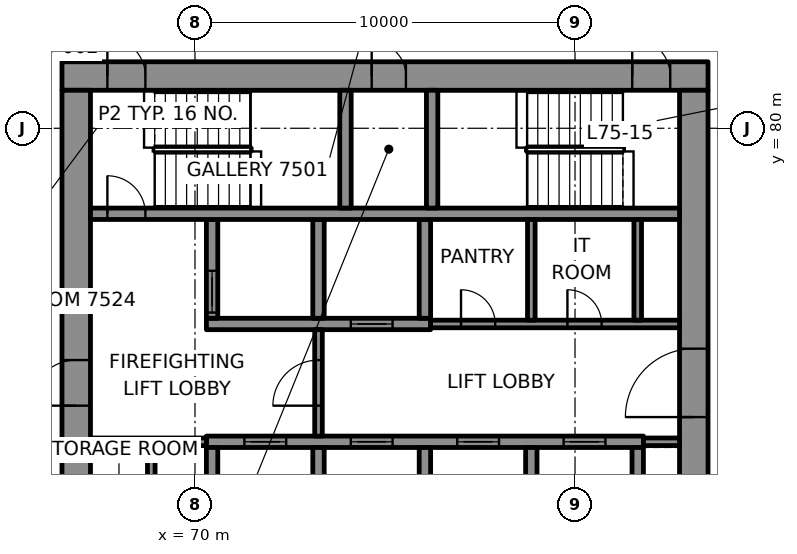
"""IFC4 building model, lengths in metres.
Left out: names, types, materials, properties, quantities, classifications, styles, units other than length and angle.
Written with IfcOpenShell. Run it as: python <this file> out.ifc"""

import sys

from ifc_helpers import new_model, si_unit, direction, frame, frame_2d, origin, place, context, subcontext, project, spatial, rectangle, extrude, element, fill, save


model = new_model("IFC4")
c1 = context("Model", 3, precision=1e-05, world=origin(), true_north=direction((0.0, 1.0)))
c2 = subcontext(c1, "Body", "Model", "MODEL_VIEW")
j1 = project(units=[si_unit("LENGTHUNIT", "METRE"), si_unit("PLANEANGLEUNIT", "RADIAN")], contexts=[c1])
p1 = place(None, origin())
s1 = spatial("IfcSite", under=j1, at=p1, CompositionType="ELEMENT")
p2 = place(p1, origin())
s2 = spatial("IfcBuilding", under=s1, at=p2, CompositionType="ELEMENT")
p3 = place(p2, frame((0.0, 0.0, 309.1)))
s3 = spatial("IfcBuildingStorey", under=s2, at=p3, CompositionType="ELEMENT", Elevation=309.1)
p4 = place(p3, frame((66.5, 81.375, 0.0), z_axis=(0.0, 0.0, 1.0), x_axis=(1.0, 0.0, 0.0)))
e1 = element("IfcWall", 1, at=p4, inside=s3, PredefinedType="SHEAR", context=c2, shape_type="SweptSolid", body=[
    extrude(rectangle(XDim=17.0, YDim=0.75, at=frame_2d((8.5, 0.0))), origin(), (0.0, 0.0, 1.0), 3.3),
])
p5 = place(p4, frame((1.195, 0.0, 0.0)))
e2 = element("IfcOpeningElement", 2, at=p5, cuts=e1, PredefinedType="OPENING", context=c2, shape_type="SweptSolid", body=[
    extrude(rectangle(XDim=1.0, YDim=2.1, at=frame_2d((0.5, 1.05))), frame((0.0, 0.385, 0.0), z_axis=(0.0, -1.0, 0.0), x_axis=(1.0, 0.0, 0.0)), (0.0, 0.0, 1.0), 0.77),
])
p6 = place(p4, frame((15.005, 0.0, 0.0)))
e3 = element("IfcOpeningElement", 3, at=p6, cuts=e1, PredefinedType="OPENING", context=c2, shape_type="SweptSolid", body=[
    extrude(rectangle(XDim=1.0, YDim=2.1, at=frame_2d((0.5, 1.05))), frame((0.0, 0.385, 0.0), z_axis=(0.0, -1.0, 0.0), x_axis=(1.0, 0.0, 0.0)), (0.0, 0.0, 1.0), 0.77),
])
p7 = place(p4, frame((8.15, 0.0, 0.0)))
e4 = element("IfcOpeningElement", 4, at=p7, cuts=e1, PredefinedType="OPENING", context=c2, shape_type="SweptSolid", body=[
    extrude(rectangle(XDim=0.9, YDim=2.1, at=frame_2d((0.45, 1.05))), frame((0.0, 0.385, 0.0), z_axis=(0.0, -1.0, 0.0), x_axis=(1.0, 0.0, 0.0)), (0.0, 0.0, 1.0), 0.77),
])
p8 = place(p3, frame((66.875, 69.0, 0.0), z_axis=(0.0, 0.0, 1.0), x_axis=(0.0, 1.0, 0.0)))
e5 = element("IfcWall", 5, at=p8, inside=s3, PredefinedType="SHEAR", context=c2, shape_type="SweptSolid", body=[
    extrude(rectangle(XDim=12.0, YDim=0.75, at=frame_2d((6.0, 0.0))), origin(), (0.0, 0.0, 1.0), 3.3),
])
p9 = place(p8, frame((3.7, 0.0, 0.0)))
e6 = element("IfcOpeningElement", 6, at=p9, cuts=e5, PredefinedType="OPENING", context=c2, shape_type="SweptSolid", body=[
    extrude(rectangle(XDim=1.2, YDim=2.1, at=frame_2d((0.6, 1.05))), frame((0.0, 0.385, 0.0), z_axis=(0.0, -1.0, 0.0), x_axis=(1.0, 0.0, 0.0)), (0.0, 0.0, 1.0), 0.77),
])
p10 = place(p8, frame((0.925, 0.0, 0.0)))
e7 = element("IfcOpeningElement", 7, at=p10, cuts=e5, PredefinedType="OPENING", context=c2, shape_type="SweptSolid", body=[
    extrude(rectangle(XDim=0.9, YDim=2.1, at=frame_2d((0.45, 1.05))), frame((0.0, 0.385, 0.0), z_axis=(0.0, -1.0, 0.0), x_axis=(1.0, 0.0, 0.0)), (0.0, 0.0, 1.0), 0.77),
])
p11 = place(p3, frame((83.125, 69.0, 0.0), z_axis=(0.0, 0.0, 1.0), x_axis=(0.0, 1.0, 0.0)))
e8 = element("IfcWall", 8, at=p11, inside=s3, PredefinedType="SHEAR", context=c2, shape_type="SweptSolid", body=[
    extrude(rectangle(XDim=12.0, YDim=0.75, at=frame_2d((6.0, 0.0))), origin(), (0.0, 0.0, 1.0), 3.3),
])
p12 = place(p11, frame((3.4, 0.0, 0.0)))
e9 = element("IfcOpeningElement", 9, at=p12, cuts=e8, PredefinedType="OPENING", context=c2, shape_type="SweptSolid", body=[
    extrude(rectangle(XDim=1.8, YDim=2.1, at=frame_2d((0.9, 1.05))), frame((0.0, 0.385, 0.0), z_axis=(0.0, -1.0, 0.0), x_axis=(1.0, 0.0, 0.0)), (0.0, 0.0, 1.0), 0.77),
])
p13 = place(p3, frame((70.3, 71.75, 0.0), z_axis=(0.0, 0.0, 1.0), x_axis=(1.0, 0.0, 0.0)))
e10 = element("IfcWall", 10, at=p13, inside=s3, PredefinedType="SHEAR", context=c2, shape_type="SweptSolid", body=[
    extrude(rectangle(XDim=11.5, YDim=0.3, at=frame_2d((5.75, 0.0))), origin(), (0.0, 0.0, 1.0), 3.3),
])
p14 = place(p13, frame((1.0, 0.0, 0.0)))
e11 = element("IfcOpeningElement", 11, at=p14, cuts=e10, PredefinedType="OPENING", context=c2, shape_type="SweptSolid", body=[
    extrude(rectangle(XDim=1.1, YDim=2.1, at=frame_2d((0.55, 1.05))), frame((0.0, 0.16, 0.0), z_axis=(0.0, -1.0, 0.0), x_axis=(1.0, 0.0, 0.0)), (0.0, 0.0, 1.0), 0.32),
])
p15 = place(p13, frame((3.8, 0.0, 0.0)))
e12 = element("IfcOpeningElement", 12, at=p15, cuts=e10, PredefinedType="OPENING", context=c2, shape_type="SweptSolid", body=[
    extrude(rectangle(XDim=1.1, YDim=2.1, at=frame_2d((0.55, 1.05))), frame((0.0, 0.16, 0.0), z_axis=(0.0, -1.0, 0.0), x_axis=(1.0, 0.0, 0.0)), (0.0, 0.0, 1.0), 0.32),
])
p16 = place(p13, frame((6.6, 0.0, 0.0)))
e13 = element("IfcOpeningElement", 13, at=p16, cuts=e10, PredefinedType="OPENING", context=c2, shape_type="SweptSolid", body=[
    extrude(rectangle(XDim=1.1, YDim=2.1, at=frame_2d((0.55, 1.05))), frame((0.0, 0.16, 0.0), z_axis=(0.0, -1.0, 0.0), x_axis=(1.0, 0.0, 0.0)), (0.0, 0.0, 1.0), 0.32),
])
p17 = place(p13, frame((9.4, 0.0, 0.0)))
e14 = element("IfcOpeningElement", 14, at=p17, cuts=e10, PredefinedType="OPENING", context=c2, shape_type="SweptSolid", body=[
    extrude(rectangle(XDim=1.1, YDim=2.1, at=frame_2d((0.55, 1.05))), frame((0.0, 0.16, 0.0), z_axis=(0.0, -1.0, 0.0), x_axis=(1.0, 0.0, 0.0)), (0.0, 0.0, 1.0), 0.32),
])
p18 = place(p3, frame((70.3, 74.85, 0.0), z_axis=(0.0, 0.0, 1.0), x_axis=(1.0, 0.0, 0.0)))
e15 = element("IfcWall", 15, at=p18, inside=s3, PredefinedType="SHEAR", context=c2, shape_type="SweptSolid", body=[
    extrude(rectangle(XDim=5.9, YDim=0.3, at=frame_2d((2.95, 0.0))), origin(), (0.0, 0.0, 1.0), 3.3),
])
p19 = place(p18, frame((3.8, 0.0, 0.0)))
e16 = element("IfcOpeningElement", 16, at=p19, cuts=e15, PredefinedType="OPENING", context=c2, shape_type="SweptSolid", body=[
    extrude(rectangle(XDim=1.1, YDim=2.1, at=frame_2d((0.55, 1.05))), frame((0.0, 0.16, 0.0), z_axis=(0.0, -1.0, 0.0), x_axis=(1.0, 0.0, 0.0)), (0.0, 0.0, 1.0), 0.32),
])
p20 = place(p3, frame((70.45, 69.0, 0.0), z_axis=(0.0, 0.0, 1.0), x_axis=(0.0, 1.0, 0.0)))
e17 = element("IfcWall", 17, at=p20, inside=s3, PredefinedType="SHEAR", context=c2, shape_type="SweptSolid", body=[
    extrude(rectangle(XDim=2.6, YDim=0.3, at=frame_2d((1.3, 0.0))), origin(), (0.0, 0.0, 1.0), 3.3),
])
p21 = place(p3, frame((70.45, 75.0, 0.0), z_axis=(0.0, 0.0, 1.0), x_axis=(0.0, 1.0, 0.0)))
e18 = element("IfcWall", 18, at=p21, inside=s3, PredefinedType="SHEAR", context=c2, shape_type="SweptSolid", body=[
    extrude(rectangle(XDim=2.6, YDim=0.3, at=frame_2d((1.3, 0.0))), origin(), (0.0, 0.0, 1.0), 3.3),
])
p22 = place(p21, frame((0.15, 0.0, 0.0)))
e19 = element("IfcOpeningElement", 19, at=p22, cuts=e18, PredefinedType="OPENING", context=c2, shape_type="SweptSolid", body=[
    extrude(rectangle(XDim=1.1, YDim=2.1, at=frame_2d((0.55, 1.05))), frame((0.0, 0.16, 0.0), z_axis=(0.0, -1.0, 0.0), x_axis=(1.0, 0.0, 0.0)), (0.0, 0.0, 1.0), 0.32),
])
for number, where, z_axis, x_axis in (
    (20, (73.25, 69.0, 0.0), (0.0, 0.0, 1.0), (0.0, 1.0, 0.0)),
    (21, (73.25, 75.0, 0.0), (0.0, 0.0, 1.0), (0.0, 1.0, 0.0)),
    (22, (76.05, 69.0, 0.0), (0.0, 0.0, 1.0), (0.0, 1.0, 0.0)),
    (23, (76.05, 75.0, 0.0), (0.0, 0.0, 1.0), (0.0, 1.0, 0.0)),
    (24, (78.85, 69.0, 0.0), (0.0, 0.0, 1.0), (0.0, 1.0, 0.0)),
    (25, (81.65, 69.0, 0.0), (0.0, 0.0, 1.0), (0.0, 1.0, 0.0)),
):
    element("IfcWall", number, at=place(p3, frame(where, z_axis=z_axis, x_axis=x_axis)), inside=s3, PredefinedType="SHEAR", context=c2, shape_type="SweptSolid", body=[
        extrude(rectangle(XDim=2.6, YDim=0.3, at=frame_2d((1.3, 0.0))), origin(), (0.0, 0.0, 1.0), 3.3),
    ])
p23 = place(p3, frame((67.25, 77.75, 0.0), z_axis=(0.0, 0.0, 1.0), x_axis=(1.0, 0.0, 0.0)))
e26 = element("IfcWall", 26, at=p23, inside=s3, PredefinedType="SHEAR", context=c2, shape_type="SweptSolid", body=[
    extrude(rectangle(XDim=15.5, YDim=0.3, at=frame_2d((7.75, 0.0))), origin(), (0.0, 0.0, 1.0), 3.3),
])
p24 = place(p23, frame((0.445, 0.0, 0.0)))
e27 = element("IfcOpeningElement", 27, at=p24, cuts=e26, PredefinedType="OPENING", context=c2, shape_type="SweptSolid", body=[
    extrude(rectangle(XDim=1.0, YDim=2.1, at=frame_2d((0.5, 1.05))), frame((0.0, 0.16, 0.0), z_axis=(0.0, -1.0, 0.0), x_axis=(1.0, 0.0, 0.0)), (0.0, 0.0, 1.0), 0.32),
])
for number, where, z_axis, x_axis in (
    (28, (73.96, 77.9, 0.0), (0.0, 0.0, 1.0), (0.0, 1.0, 0.0)),
    (29, (76.24, 77.9, 0.0), (0.0, 0.0, 1.0), (0.0, 1.0, 0.0)),
):
    element("IfcWall", number, at=place(p3, frame(where, z_axis=z_axis, x_axis=x_axis)), inside=s3, PredefinedType="SHEAR", context=c2, shape_type="SweptSolid", body=[
        extrude(rectangle(XDim=3.1, YDim=0.3, at=frame_2d((1.55, 0.0))), origin(), (0.0, 0.0, 1.0), 3.3),
    ])
p25 = place(p3, frame((67.25, 71.75, 0.0), z_axis=(0.0, 0.0, 1.0), x_axis=(1.0, 0.0, 0.0)))
e30 = element("IfcWall", 30, at=p25, inside=s3, PredefinedType="PARTITIONING", context=c2, shape_type="SweptSolid", body=[
    extrude(rectangle(XDim=3.05, YDim=0.2, at=frame_2d((1.525, 0.0))), origin(), (0.0, 0.0, 1.0), 3.3),
])
p26 = place(p3, frame((81.8, 71.75, 0.0), z_axis=(0.0, 0.0, 1.0), x_axis=(1.0, 0.0, 0.0)))
e31 = element("IfcWall", 31, at=p26, inside=s3, PredefinedType="PARTITIONING", context=c2, shape_type="SweptSolid", body=[
    extrude(rectangle(XDim=0.95, YDim=0.2, at=frame_2d((0.475, 0.0))), origin(), (0.0, 0.0, 1.0), 3.3),
])
p27 = place(p3, frame((76.2, 74.85, 0.0), z_axis=(0.0, 0.0, 1.0), x_axis=(1.0, 0.0, 0.0)))
e32 = element("IfcWall", 32, at=p27, inside=s3, PredefinedType="PARTITIONING", context=c2, shape_type="SweptSolid", body=[
    extrude(rectangle(XDim=6.55, YDim=0.2, at=frame_2d((3.275, 0.0))), origin(), (0.0, 0.0, 1.0), 3.3),
])
p28 = place(p27, frame((0.8, 0.0, 0.0)))
e33 = element("IfcOpeningElement", 33, at=p28, cuts=e32, PredefinedType="OPENING", context=c2, shape_type="SweptSolid", body=[
    extrude(rectangle(XDim=0.9, YDim=2.1, at=frame_2d((0.45, 1.05))), frame((0.0, 0.11, 0.0), z_axis=(0.0, -1.0, 0.0), x_axis=(1.0, 0.0, 0.0)), (0.0, 0.0, 1.0), 0.22),
])
p29 = place(p27, frame((3.6, 0.0, 0.0)))
e34 = element("IfcOpeningElement", 34, at=p29, cuts=e32, PredefinedType="OPENING", context=c2, shape_type="SweptSolid", body=[
    extrude(rectangle(XDim=0.9, YDim=2.1, at=frame_2d((0.45, 1.05))), frame((0.0, 0.11, 0.0), z_axis=(0.0, -1.0, 0.0), x_axis=(1.0, 0.0, 0.0)), (0.0, 0.0, 1.0), 0.22),
])
p30 = place(p3, frame((68.85, 69.0, 0.0), z_axis=(0.0, 0.0, 1.0), x_axis=(0.0, 1.0, 0.0)))
e35 = element("IfcWall", 35, at=p30, inside=s3, PredefinedType="PARTITIONING", context=c2, shape_type="SweptSolid", body=[
    extrude(rectangle(XDim=2.65, YDim=0.2, at=frame_2d((1.325, 0.0))), origin(), (0.0, 0.0, 1.0), 3.3),
])
p31 = place(p3, frame((73.25, 71.9, 0.0), z_axis=(0.0, 0.0, 1.0), x_axis=(0.0, 1.0, 0.0)))
e36 = element("IfcWall", 36, at=p31, inside=s3, PredefinedType="PARTITIONING", context=c2, shape_type="SweptSolid", body=[
    extrude(rectangle(XDim=2.8, YDim=0.2, at=frame_2d((1.4, 0.0))), origin(), (0.0, 0.0, 1.0), 3.3),
])
p32 = place(p31, frame((0.8, 0.0, 0.0)))
e37 = element("IfcOpeningElement", 37, at=p32, cuts=e36, PredefinedType="OPENING", context=c2, shape_type="SweptSolid", body=[
    extrude(rectangle(XDim=1.2, YDim=2.1, at=frame_2d((0.6, 1.05))), frame((0.0, 0.11, 0.0), z_axis=(0.0, -1.0, 0.0), x_axis=(1.0, 0.0, 0.0)), (0.0, 0.0, 1.0), 0.22),
])
for number, where, z_axis, x_axis in (
    (38, (78.85, 74.95, 0.0), (0.0, 0.0, 1.0), (0.0, 1.0, 0.0)),
    (39, (81.65, 74.95, 0.0), (0.0, 0.0, 1.0), (0.0, 1.0, 0.0)),
):
    element("IfcWall", number, at=place(p3, frame(where, z_axis=z_axis, x_axis=x_axis)), inside=s3, PredefinedType="PARTITIONING", context=c2, shape_type="SweptSolid", body=[
        extrude(rectangle(XDim=2.65, YDim=0.2, at=frame_2d((1.325, 0.0))), origin(), (0.0, 0.0, 1.0), 3.3),
    ])
p33 = place(p14, origin())
e40 = element("IfcDoor", 40, at=p33, inside=s3, OperationType="DOUBLE_DOOR_SLIDING", PredefinedType="DOOR", context=c2, shape_type="SweptSolid", body=[
    extrude(rectangle(XDim=1.1, YDim=2.1, at=frame_2d((0.55, 1.05))), frame((0.0, 0.025, 0.0), z_axis=(0.0, -1.0, 0.0), x_axis=(1.0, 0.0, 0.0)), (0.0, 0.0, 1.0), 0.05),
])
fill(e11, e40)
p34 = place(p15, origin())
e41 = element("IfcDoor", 41, at=p34, inside=s3, OperationType="DOUBLE_DOOR_SLIDING", PredefinedType="DOOR", context=c2, shape_type="SweptSolid", body=[
    extrude(rectangle(XDim=1.1, YDim=2.1, at=frame_2d((0.55, 1.05))), frame((0.0, 0.025, 0.0), z_axis=(0.0, -1.0, 0.0), x_axis=(1.0, 0.0, 0.0)), (0.0, 0.0, 1.0), 0.05),
])
fill(e12, e41)
p35 = place(p16, origin())
e42 = element("IfcDoor", 42, at=p35, inside=s3, OperationType="DOUBLE_DOOR_SLIDING", PredefinedType="DOOR", context=c2, shape_type="SweptSolid", body=[
    extrude(rectangle(XDim=1.1, YDim=2.1, at=frame_2d((0.55, 1.05))), frame((0.0, 0.025, 0.0), z_axis=(0.0, -1.0, 0.0), x_axis=(1.0, 0.0, 0.0)), (0.0, 0.0, 1.0), 0.05),
])
fill(e13, e42)
p36 = place(p17, origin())
e43 = element("IfcDoor", 43, at=p36, inside=s3, OperationType="DOUBLE_DOOR_SLIDING", PredefinedType="DOOR", context=c2, shape_type="SweptSolid", body=[
    extrude(rectangle(XDim=1.1, YDim=2.1, at=frame_2d((0.55, 1.05))), frame((0.0, 0.025, 0.0), z_axis=(0.0, -1.0, 0.0), x_axis=(1.0, 0.0, 0.0)), (0.0, 0.0, 1.0), 0.05),
])
fill(e14, e43)
p37 = place(p22, origin())
e44 = element("IfcDoor", 44, at=p37, inside=s3, OperationType="DOUBLE_DOOR_SLIDING", PredefinedType="DOOR", context=c2, shape_type="SweptSolid", body=[
    extrude(rectangle(XDim=1.1, YDim=2.1, at=frame_2d((0.55, 1.05))), frame((0.0, 0.025, 0.0), z_axis=(0.0, -1.0, 0.0), x_axis=(1.0, 0.0, 0.0)), (0.0, 0.0, 1.0), 0.05),
])
fill(e19, e44)
p38 = place(p19, origin())
e45 = element("IfcDoor", 45, at=p38, inside=s3, OperationType="DOUBLE_DOOR_SLIDING", PredefinedType="DOOR", context=c2, shape_type="SweptSolid", body=[
    extrude(rectangle(XDim=1.1, YDim=2.1, at=frame_2d((0.55, 1.05))), frame((0.0, 0.025, 0.0), z_axis=(0.0, -1.0, 0.0), x_axis=(1.0, 0.0, 0.0)), (0.0, 0.0, 1.0), 0.05),
])
fill(e16, e45)
p39 = place(p24, origin())
e46 = element("IfcDoor", 46, at=p39, inside=s3, OperationType="SINGLE_SWING_LEFT", PredefinedType="DOOR", context=c2, shape_type="SweptSolid", body=[
    extrude(rectangle(XDim=1.0, YDim=2.1, at=frame_2d((0.5, 1.05))), frame((0.0, 0.025, 0.0), z_axis=(0.0, -1.0, 0.0), x_axis=(1.0, 0.0, 0.0)), (0.0, 0.0, 1.0), 0.05),
])
fill(e27, e46)
p40 = place(p5, origin())
e47 = element("IfcDoor", 47, at=p40, inside=s3, OperationType="SINGLE_SWING_RIGHT", PredefinedType="DOOR", context=c2, shape_type="SweptSolid", body=[
    extrude(rectangle(XDim=1.0, YDim=2.1, at=frame_2d((0.5, 1.05))), frame((0.0, 0.095, 0.0), z_axis=(0.0, -1.0, 0.0), x_axis=(1.0, 0.0, 0.0)), (0.0, 0.0, 1.0), 0.19),
])
fill(e2, e47)
p41 = place(p6, origin())
e48 = element("IfcDoor", 48, at=p41, inside=s3, OperationType="SINGLE_SWING_LEFT", PredefinedType="DOOR", context=c2, shape_type="SweptSolid", body=[
    extrude(rectangle(XDim=1.0, YDim=2.1, at=frame_2d((0.5, 1.05))), frame((0.0, 0.095, 0.0), z_axis=(0.0, -1.0, 0.0), x_axis=(1.0, 0.0, 0.0)), (0.0, 0.0, 1.0), 0.19),
])
fill(e3, e48)
p42 = place(p32, origin())
e49 = element("IfcDoor", 49, at=p42, inside=s3, OperationType="SINGLE_SWING_LEFT", PredefinedType="DOOR", context=c2, shape_type="SweptSolid", body=[
    extrude(rectangle(XDim=1.2, YDim=2.1, at=frame_2d((0.6, 1.05))), frame((0.0, 0.025, 0.0), z_axis=(0.0, -1.0, 0.0), x_axis=(1.0, 0.0, 0.0)), (0.0, 0.0, 1.0), 0.05),
])
fill(e37, e49)
p43 = place(p9, origin())
e50 = element("IfcDoor", 50, at=p43, inside=s3, OperationType="SINGLE_SWING_RIGHT", PredefinedType="DOOR", context=c2, shape_type="SweptSolid", body=[
    extrude(rectangle(XDim=1.2, YDim=2.1, at=frame_2d((0.6, 1.05))), frame((0.0, 0.095, 0.0), z_axis=(0.0, -1.0, 0.0), x_axis=(1.0, 0.0, 0.0)), (0.0, 0.0, 1.0), 0.19),
])
fill(e6, e50)
p44 = place(p12, origin())
e51 = element("IfcDoor", 51, at=p44, inside=s3, OperationType="SINGLE_SWING_LEFT", PredefinedType="DOOR", context=c2, shape_type="SweptSolid", body=[
    extrude(rectangle(XDim=1.8, YDim=2.1, at=frame_2d((0.9, 1.05))), frame((0.0, 0.095, 0.0), z_axis=(0.0, -1.0, 0.0), x_axis=(1.0, 0.0, 0.0)), (0.0, 0.0, 1.0), 0.19),
])
fill(e9, e51)
p45 = place(p28, origin())
e52 = element("IfcDoor", 52, at=p45, inside=s3, OperationType="SINGLE_SWING_RIGHT", PredefinedType="DOOR", context=c2, shape_type="SweptSolid", body=[
    extrude(rectangle(XDim=0.9, YDim=2.1, at=frame_2d((0.45, 1.05))), frame((0.0, 0.025, 0.0), z_axis=(0.0, -1.0, 0.0), x_axis=(1.0, 0.0, 0.0)), (0.0, 0.0, 1.0), 0.05),
])
fill(e33, e52)
p46 = place(p29, origin())
e53 = element("IfcDoor", 53, at=p46, inside=s3, OperationType="SINGLE_SWING_LEFT", PredefinedType="DOOR", context=c2, shape_type="SweptSolid", body=[
    extrude(rectangle(XDim=0.9, YDim=2.1, at=frame_2d((0.45, 1.05))), frame((0.0, 0.025, 0.0), z_axis=(0.0, -1.0, 0.0), x_axis=(1.0, 0.0, 0.0)), (0.0, 0.0, 1.0), 0.05),
])
fill(e34, e53)
p47 = place(p7, origin())
e54 = element("IfcDoor", 54, at=p47, inside=s3, OperationType="SINGLE_SWING_RIGHT", PredefinedType="DOOR", context=c2, shape_type="SweptSolid", body=[
    extrude(rectangle(XDim=0.9, YDim=2.1, at=frame_2d((0.45, 1.05))), frame((0.0, 0.095, 0.0), z_axis=(0.0, -1.0, 0.0), x_axis=(1.0, 0.0, 0.0)), (0.0, 0.0, 1.0), 0.19),
])
fill(e4, e54)
save(model, sys.argv[1])
